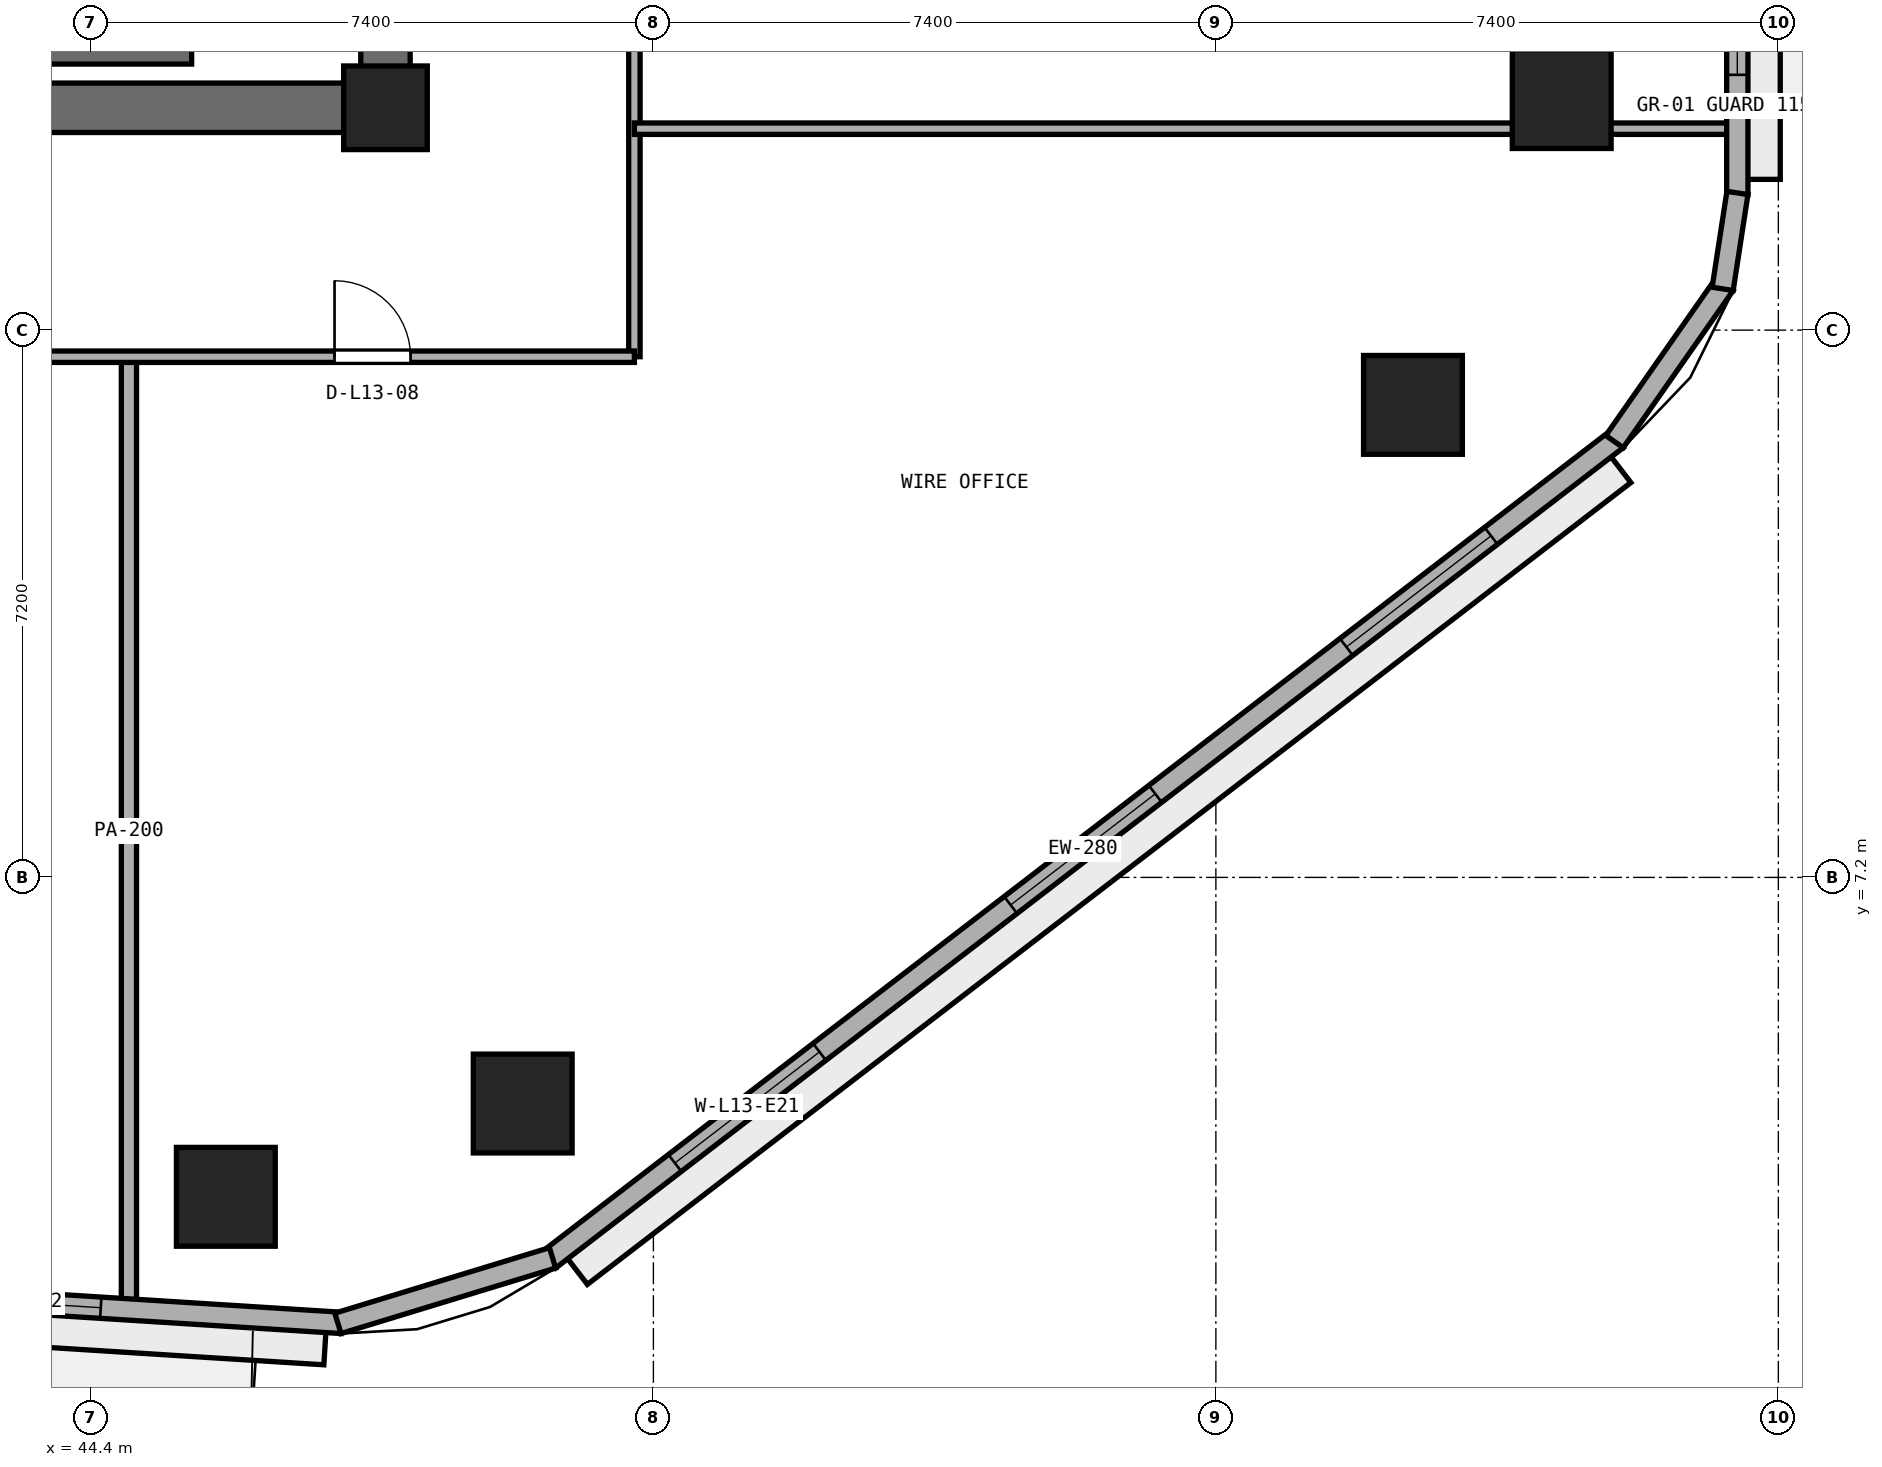
"""IFC4 building model, lengths in metres.
Left out: names, types, materials, properties, quantities, classifications, styles, units other than length and angle.
Written with IfcOpenShell. Run it as: python <this file> out.ifc"""

import sys

from ifc_helpers import new_model, si_unit, direction, frame, frame_2d, origin, origin_2d, place, context, subcontext, project, spatial, rectangle, extrude, element, fill, save


model = new_model("IFC4")
c1 = context("Model", 3, precision=1e-05, world=origin(), true_north=direction((0.0, 1.0)))
c2 = subcontext(c1, "Body", "Model", "MODEL_VIEW")
j1 = project(units=[si_unit("LENGTHUNIT", "METRE"), si_unit("PLANEANGLEUNIT", "RADIAN")], contexts=[c1])
p1 = place(None, origin())
s1 = spatial("IfcSite", under=j1, at=p1, CompositionType="ELEMENT")
p2 = place(p1, origin())
s2 = spatial("IfcBuilding", under=s1, at=p2, CompositionType="ELEMENT")
p3 = place(p2, frame((0.0, 0.0, 55.4)))
s3 = spatial("IfcBuildingStorey", under=s2, at=p3, CompositionType="ELEMENT", Elevation=55.4)
p4 = place(p3, frame((25.4, 17.325, 0.0), z_axis=(0.0, 0.0, 1.0), x_axis=(1.0, 0.0, 0.0)))
e1 = element("IfcWall", 1, at=p4, inside=s3, PredefinedType="SHEAR", context=c2, shape_type="SweptSolid", body=[
    extrude(rectangle(XDim=23.2, YDim=0.65, at=frame_2d((11.6, 0.0))), origin(), (0.0, 0.0, 1.0), 3.525),
])
p5 = place(p3, frame((48.275, 17.65, 0.0), z_axis=(0.0, 0.0, 1.0), x_axis=(0.0, 1.0, 0.0)))
e2 = element("IfcWall", 2, at=p5, inside=s3, PredefinedType="SHEAR", context=c2, shape_type="SweptSolid", body=[
    extrude(rectangle(XDim=15.1, YDim=0.65, at=frame_2d((7.55, 0.0))), origin(), (0.0, 0.0, 1.0), 3.525),
])
p6 = place(p5, frame((5.65, 0.0, 0.0)))
e3 = element("IfcOpeningElement", 3, at=p6, cuts=e2, PredefinedType="OPENING", context=c2, shape_type="SweptSolid", body=[
    extrude(rectangle(XDim=1.5, YDim=2.15, at=frame_2d((0.75, 1.075))), frame((0.0, 0.335, 0.0), z_axis=(0.0, -1.0, 0.0), x_axis=(1.0, 0.0, 0.0)), (0.0, 0.0, 1.0), 0.67),
])
p7 = place(p3, frame((48.275, 17.325, 0.0), z_axis=(0.0, 0.0, 1.0), x_axis=(1.0, 0.0, 0.0)))
e4 = element("IfcColumn", 4, at=p7, inside=s3, PredefinedType="PILASTER", context=c2, shape_type="SweptSolid", body=[
    extrude(rectangle(XDim=1.1, YDim=1.1, at=origin_2d()), origin(), (0.0, 0.0, 1.0), 3.8),
])
for number, where, z_axis, x_axis in (
    (5, (46.175, 2.998, 0.0), (0.0, 0.0, 1.0), (1.0, 0.0, 0.0)),
    (6, (50.081, 4.225, 0.0), (0.0, 0.0, 1.0), (1.0, 0.0, 0.0)),
    (7, (61.793, 13.416, 0.0), (0.0, 0.0, 1.0), (1.0, 0.0, 0.0)),
    (8, (63.75, 17.44, 0.0), (0.0, 0.0, 1.0), (1.0, 0.0, 0.0)),
):
    element("IfcColumn", number, at=place(p3, frame(where, z_axis=z_axis, x_axis=x_axis)), inside=s3, PredefinedType="COLUMN", context=c2, shape_type="SweptSolid", body=[
        extrude(rectangle(XDim=1.3, YDim=1.3, at=origin_2d()), origin(), (0.0, 0.0, 1.0), 3.8),
    ])
p8 = place(p3, frame((38.425, 18.025, 0.0), z_axis=(0.0, 0.0, 1.0), x_axis=(1.0, 0.0, 0.0)))
e9 = element("IfcWall", 9, at=p8, inside=s3, PredefinedType="SHEAR", context=c2, shape_type="SweptSolid", body=[
    extrude(rectangle(XDim=7.3, YDim=0.25, at=frame_2d((3.65, 0.0))), origin(), (0.0, 0.0, 1.0), 3.525),
])
p9 = place(p3, frame((51.55, 14.05, 0.0), z_axis=(0.0, 0.0, 1.0), x_axis=(0.0, 1.0, 0.0)))
e10 = element("IfcWall", 10, at=p9, inside=s3, PredefinedType="PARTITIONING", context=c2, shape_type="SweptSolid", body=[
    extrude(rectangle(XDim=22.3, YDim=0.15, at=frame_2d((11.15, 0.0))), origin(), (0.0, 0.0, 1.0), 3.525),
])
p10 = place(p9, frame((4.325, 0.0, 0.0)))
e11 = element("IfcOpeningElement", 11, at=p10, cuts=e10, PredefinedType="OPENING", context=c2, shape_type="SweptSolid", body=[
    extrude(rectangle(XDim=0.9, YDim=2.1, at=frame_2d((0.45, 1.05))), frame((0.0, 0.085, 0.0), z_axis=(0.0, -1.0, 0.0), x_axis=(1.0, 0.0, 0.0)), (0.0, 0.0, 1.0), 0.17),
])
p11 = place(p9, frame((10.05, 0.0, 0.0)))
e12 = element("IfcOpeningElement", 12, at=p11, cuts=e10, PredefinedType="OPENING", context=c2, shape_type="SweptSolid", body=[
    extrude(rectangle(XDim=1.0, YDim=2.12, at=frame_2d((0.5, 1.06))), frame((0.0, 0.085, 0.0), z_axis=(0.0, -1.0, 0.0), x_axis=(1.0, 0.0, 0.0)), (0.0, 0.0, 1.0), 0.17),
])
p12 = place(p9, frame((16.425, 0.0, 0.0)))
e13 = element("IfcOpeningElement", 13, at=p12, cuts=e10, PredefinedType="OPENING", context=c2, shape_type="SweptSolid", body=[
    extrude(rectangle(XDim=1.0, YDim=2.12, at=frame_2d((0.5, 1.06))), frame((0.0, 0.085, 0.0), z_axis=(0.0, -1.0, 0.0), x_axis=(1.0, 0.0, 0.0)), (0.0, 0.0, 1.0), 0.17),
])
p13 = place(p3, frame((44.9, 1.58, 0.0), z_axis=(0.0, 0.0, 1.0), x_axis=(0.0, 1.0, 0.0)))
e14 = element("IfcWall", 14, at=p13, inside=s3, PredefinedType="PARTITIONING", context=c2, shape_type="SweptSolid", body=[
    extrude(rectangle(XDim=12.47, YDim=0.2, at=frame_2d((6.235, 0.0))), origin(), (0.0, 0.0, 1.0), 3.525),
])
p14 = place(p3, frame((22.45, 14.05, 0.0), z_axis=(0.0, 0.0, 1.0), x_axis=(1.0, 0.0, 0.0)))
e15 = element("IfcWall", 15, at=p14, inside=s3, PredefinedType="PARTITIONING", context=c2, shape_type="SweptSolid", body=[
    extrude(rectangle(XDim=29.1, YDim=0.15, at=frame_2d((14.55, 0.0))), origin(), (0.0, 0.0, 1.0), 3.525),
])
p15 = place(p14, frame((2.345, 0.0, 0.0)))
e16 = element("IfcOpeningElement", 16, at=p15, cuts=e15, PredefinedType="OPENING", context=c2, shape_type="SweptSolid", body=[
    extrude(rectangle(XDim=1.0, YDim=2.12, at=frame_2d((0.5, 1.06))), frame((0.0, 0.085, 0.0), z_axis=(0.0, -1.0, 0.0), x_axis=(1.0, 0.0, 0.0)), (0.0, 0.0, 1.0), 0.17),
])
p16 = place(p14, frame((9.3, 0.0, 0.0)))
e17 = element("IfcOpeningElement", 17, at=p16, cuts=e15, PredefinedType="OPENING", context=c2, shape_type="SweptSolid", body=[
    extrude(rectangle(XDim=1.0, YDim=2.12, at=frame_2d((0.5, 1.06))), frame((0.0, 0.085, 0.0), z_axis=(0.0, -1.0, 0.0), x_axis=(1.0, 0.0, 0.0)), (0.0, 0.0, 1.0), 0.17),
])
p17 = place(p14, frame((17.8, 0.0, 0.0)))
e18 = element("IfcOpeningElement", 18, at=p17, cuts=e15, PredefinedType="OPENING", context=c2, shape_type="SweptSolid", body=[
    extrude(rectangle(XDim=1.0, YDim=2.12, at=frame_2d((0.5, 1.06))), frame((0.0, 0.085, 0.0), z_axis=(0.0, -1.0, 0.0), x_axis=(1.0, 0.0, 0.0)), (0.0, 0.0, 1.0), 0.17),
])
p18 = place(p14, frame((25.155, 0.0, 0.0)))
e19 = element("IfcOpeningElement", 19, at=p18, cuts=e15, PredefinedType="OPENING", context=c2, shape_type="SweptSolid", body=[
    extrude(rectangle(XDim=1.0, YDim=2.12, at=frame_2d((0.5, 1.06))), frame((0.0, 0.085, 0.0), z_axis=(0.0, -1.0, 0.0), x_axis=(1.0, 0.0, 0.0)), (0.0, 0.0, 1.0), 0.17),
])
p19 = place(p3, frame((51.55, 17.05, 0.0), z_axis=(0.0, 0.0, 1.0), x_axis=(1.0, 0.0, 0.0)))
e20 = element("IfcWall", 20, at=p19, inside=s3, PredefinedType="PARTITIONING", context=c2, shape_type="SweptSolid", body=[
    extrude(rectangle(XDim=14.445, YDim=0.15, at=frame_2d((7.223, 0.0))), origin(), (0.0, 0.0, 1.0), 3.525),
])
p20 = place(p3, frame((28.161, 2.571, 0.0), z_axis=(0.0, 0.0, 1.0), x_axis=(0.998017288298, -0.06294038654, 0.0)))
e21 = element("IfcWall", 21, at=p20, inside=s3, PredefinedType="STANDARD", context=c2, shape_type="SweptSolid", body=[
    extrude(rectangle(XDim=19.577, YDim=0.28, at=frame_2d((9.789, 0.0))), origin(), (0.0, 0.0, 1.0), 3.525),
])
p21 = place(p20, frame((9.239, 0.0, 0.0)))
e22 = element("IfcOpeningElement", 22, at=p21, cuts=e21, PredefinedType="OPENING", context=c2, shape_type="SweptSolid", body=[
    extrude(rectangle(XDim=1.1, YDim=2.2, at=frame_2d((0.55, 1.1))), frame((0.0, 0.15, 0.0), z_axis=(0.0, -1.0, 0.0), x_axis=(1.0, 0.0, 0.0)), (0.0, 0.0, 1.0), 0.3),
])
p22 = place(p20, frame((2.396, 0.0, 0.9)))
e23 = element("IfcOpeningElement", 23, at=p22, cuts=e21, PredefinedType="OPENING", context=c2, shape_type="SweptSolid", body=[
    extrude(rectangle(XDim=2.4, YDim=1.75, at=frame_2d((1.2, 0.875))), frame((0.0, 0.15, 0.0), z_axis=(0.0, -1.0, 0.0), x_axis=(1.0, 0.0, 0.0)), (0.0, 0.0, 1.0), 0.3),
])
p23 = place(p20, frame((14.001, 0.0, 0.9)))
e24 = element("IfcOpeningElement", 24, at=p23, cuts=e21, PredefinedType="OPENING", context=c2, shape_type="SweptSolid", body=[
    extrude(rectangle(XDim=2.4, YDim=1.75, at=frame_2d((1.2, 0.875))), frame((0.0, 0.15, 0.0), z_axis=(0.0, -1.0, 0.0), x_axis=(1.0, 0.0, 0.0)), (0.0, 0.0, 1.0), 0.3),
])
p24 = place(p3, frame((50.429, 2.172, 0.0), z_axis=(0.0, 0.0, 1.0), x_axis=(0.792937466367, 0.609303023488, 0.0)))
e25 = element("IfcWall", 25, at=p24, inside=s3, PredefinedType="STANDARD", context=c2, shape_type="SweptSolid", body=[
    extrude(rectangle(XDim=17.713, YDim=0.28, at=frame_2d((8.856, 0.0))), origin(), (0.0, 0.0, 1.0), 3.525),
])
p25 = place(p24, frame((2.085, 0.0, 0.9)))
e26 = element("IfcOpeningElement", 26, at=p25, cuts=e25, PredefinedType="OPENING", context=c2, shape_type="SweptSolid", body=[
    extrude(rectangle(XDim=2.4, YDim=1.75, at=frame_2d((1.2, 0.875))), frame((0.0, 0.15, 0.0), z_axis=(0.0, -1.0, 0.0), x_axis=(1.0, 0.0, 0.0)), (0.0, 0.0, 1.0), 0.3),
])
p26 = place(p24, frame((7.656, 0.0, 0.9)))
e27 = element("IfcOpeningElement", 27, at=p26, cuts=e25, PredefinedType="OPENING", context=c2, shape_type="SweptSolid", body=[
    extrude(rectangle(XDim=2.4, YDim=1.75, at=frame_2d((1.2, 0.875))), frame((0.0, 0.15, 0.0), z_axis=(0.0, -1.0, 0.0), x_axis=(1.0, 0.0, 0.0)), (0.0, 0.0, 1.0), 0.3),
])
p27 = place(p24, frame((13.227, 0.0, 0.9)))
e28 = element("IfcOpeningElement", 28, at=p27, cuts=e25, PredefinedType="OPENING", context=c2, shape_type="SweptSolid", body=[
    extrude(rectangle(XDim=2.4, YDim=1.75, at=frame_2d((1.2, 0.875))), frame((0.0, 0.15, 0.0), z_axis=(0.0, -1.0, 0.0), x_axis=(1.0, 0.0, 0.0)), (0.0, 0.0, 1.0), 0.3),
])
p28 = place(p3, frame((66.06, 16.183, 0.0), z_axis=(0.0, 0.0, 1.0), x_axis=(0.0, 1.0, 0.0)))
e29 = element("IfcWall", 29, at=p28, inside=s3, PredefinedType="STANDARD", context=c2, shape_type="SweptSolid", body=[
    extrude(rectangle(XDim=19.331, YDim=0.28, at=frame_2d((9.666, 0.0))), origin(), (0.0, 0.0, 1.0), 3.525),
])
p29 = place(p28, frame((9.115, 0.0, 0.0)))
e30 = element("IfcOpeningElement", 30, at=p29, cuts=e29, PredefinedType="OPENING", context=c2, shape_type="SweptSolid", body=[
    extrude(rectangle(XDim=1.1, YDim=2.2, at=frame_2d((0.55, 1.1))), frame((0.0, 0.15, 0.0), z_axis=(0.0, -1.0, 0.0), x_axis=(1.0, 0.0, 0.0)), (0.0, 0.0, 1.0), 0.3),
])
p30 = place(p28, frame((1.575, 0.0, 0.9)))
e31 = element("IfcOpeningElement", 31, at=p30, cuts=e29, PredefinedType="OPENING", context=c2, shape_type="SweptSolid", body=[
    extrude(rectangle(XDim=2.4, YDim=1.75, at=frame_2d((1.2, 0.875))), frame((0.0, 0.15, 0.0), z_axis=(0.0, -1.0, 0.0), x_axis=(1.0, 0.0, 0.0)), (0.0, 0.0, 1.0), 0.3),
])
p31 = place(p28, frame((14.326, 0.0, 0.9)))
e32 = element("IfcOpeningElement", 32, at=p31, cuts=e29, PredefinedType="OPENING", context=c2, shape_type="SweptSolid", body=[
    extrude(rectangle(XDim=2.4, YDim=1.75, at=frame_2d((1.2, 0.875))), frame((0.0, 0.15, 0.0), z_axis=(0.0, -1.0, 0.0), x_axis=(1.0, 0.0, 0.0)), (0.0, 0.0, 1.0), 0.3),
])
p32 = place(p3, frame((47.65, 1.333, 0.0), z_axis=(0.0, 0.0, 1.0), x_axis=(0.956461287977, 0.291859220516, 0.0)))
e33 = element("IfcWall", 33, at=p32, inside=s3, PredefinedType="STANDARD", context=c2, shape_type="SweptSolid", body=[
    extrude(rectangle(XDim=2.952, YDim=0.28, at=frame_2d((1.476, 0.0))), origin(), (0.0, 0.0, 1.0), 3.525),
])
p33 = place(p3, frame((64.444, 12.933, 0.0), z_axis=(0.0, 0.0, 1.0), x_axis=(0.573176686443, 0.819431806875, 0.0)))
e34 = element("IfcWall", 34, at=p33, inside=s3, PredefinedType="STANDARD", context=c2, shape_type="SweptSolid", body=[
    extrude(rectangle(XDim=2.524, YDim=0.28, at=frame_2d((1.262, 0.0))), origin(), (0.0, 0.0, 1.0), 3.525),
])
p34 = place(p3, frame((65.867, 14.943, 0.0), z_axis=(0.0, 0.0, 1.0), x_axis=(0.152014078361, 0.988378328364, 0.0)))
e35 = element("IfcWall", 35, at=p34, inside=s3, PredefinedType="STANDARD", context=c2, shape_type="SweptSolid", body=[
    extrude(rectangle(XDim=1.277, YDim=0.28, at=frame_2d((0.638, 0.0))), origin(), (0.0, 0.0, 1.0), 3.525),
])
p35 = place(p18, origin())
e36 = element("IfcDoor", 36, at=p35, inside=s3, OperationType="SINGLE_SWING_LEFT", PredefinedType="DOOR", context=c2, shape_type="SweptSolid", body=[
    extrude(rectangle(XDim=1.0, YDim=2.12, at=frame_2d((0.5, 1.06))), frame((0.0, 0.025, 0.0), z_axis=(0.0, -1.0, 0.0), x_axis=(1.0, 0.0, 0.0)), (0.0, 0.0, 1.0), 0.05),
])
fill(e19, e36)
p36 = place(p23, origin())
e37 = element("IfcWindow", 37, at=p36, inside=s3, PartitioningType="SINGLE_PANEL", PredefinedType="WINDOW", context=c2, shape_type="SweptSolid", body=[
    extrude(rectangle(XDim=2.4, YDim=1.75, at=frame_2d((1.2, 0.875))), frame((0.0, 0.03, 0.0), z_axis=(0.0, -1.0, 0.0), x_axis=(1.0, 0.0, 0.0)), (0.0, 0.0, 1.0), 0.06),
])
fill(e24, e37)
p37 = place(p25, origin())
e38 = element("IfcWindow", 38, at=p37, inside=s3, PartitioningType="SINGLE_PANEL", PredefinedType="WINDOW", context=c2, shape_type="SweptSolid", body=[
    extrude(rectangle(XDim=2.4, YDim=1.75, at=frame_2d((1.2, 0.875))), frame((0.0, 0.03, 0.0), z_axis=(0.0, -1.0, 0.0), x_axis=(1.0, 0.0, 0.0)), (0.0, 0.0, 1.0), 0.06),
])
fill(e26, e38)
p38 = place(p26, origin())
e39 = element("IfcWindow", 39, at=p38, inside=s3, PartitioningType="SINGLE_PANEL", PredefinedType="WINDOW", context=c2, shape_type="SweptSolid", body=[
    extrude(rectangle(XDim=2.4, YDim=1.75, at=frame_2d((1.2, 0.875))), frame((0.0, 0.03, 0.0), z_axis=(0.0, -1.0, 0.0), x_axis=(1.0, 0.0, 0.0)), (0.0, 0.0, 1.0), 0.06),
])
fill(e27, e39)
p39 = place(p27, origin())
e40 = element("IfcWindow", 40, at=p39, inside=s3, PartitioningType="SINGLE_PANEL", PredefinedType="WINDOW", context=c2, shape_type="SweptSolid", body=[
    extrude(rectangle(XDim=2.4, YDim=1.75, at=frame_2d((1.2, 0.875))), frame((0.0, 0.03, 0.0), z_axis=(0.0, -1.0, 0.0), x_axis=(1.0, 0.0, 0.0)), (0.0, 0.0, 1.0), 0.06),
])
fill(e28, e40)
p40 = place(p30, origin())
e41 = element("IfcWindow", 41, at=p40, inside=s3, PartitioningType="SINGLE_PANEL", PredefinedType="WINDOW", context=c2, shape_type="SweptSolid", body=[
    extrude(rectangle(XDim=2.4, YDim=1.75, at=frame_2d((1.2, 0.875))), frame((0.0, 0.03, 0.0), z_axis=(0.0, -1.0, 0.0), x_axis=(1.0, 0.0, 0.0)), (0.0, 0.0, 1.0), 0.06),
])
fill(e31, e41)
save(model, sys.argv[1])
